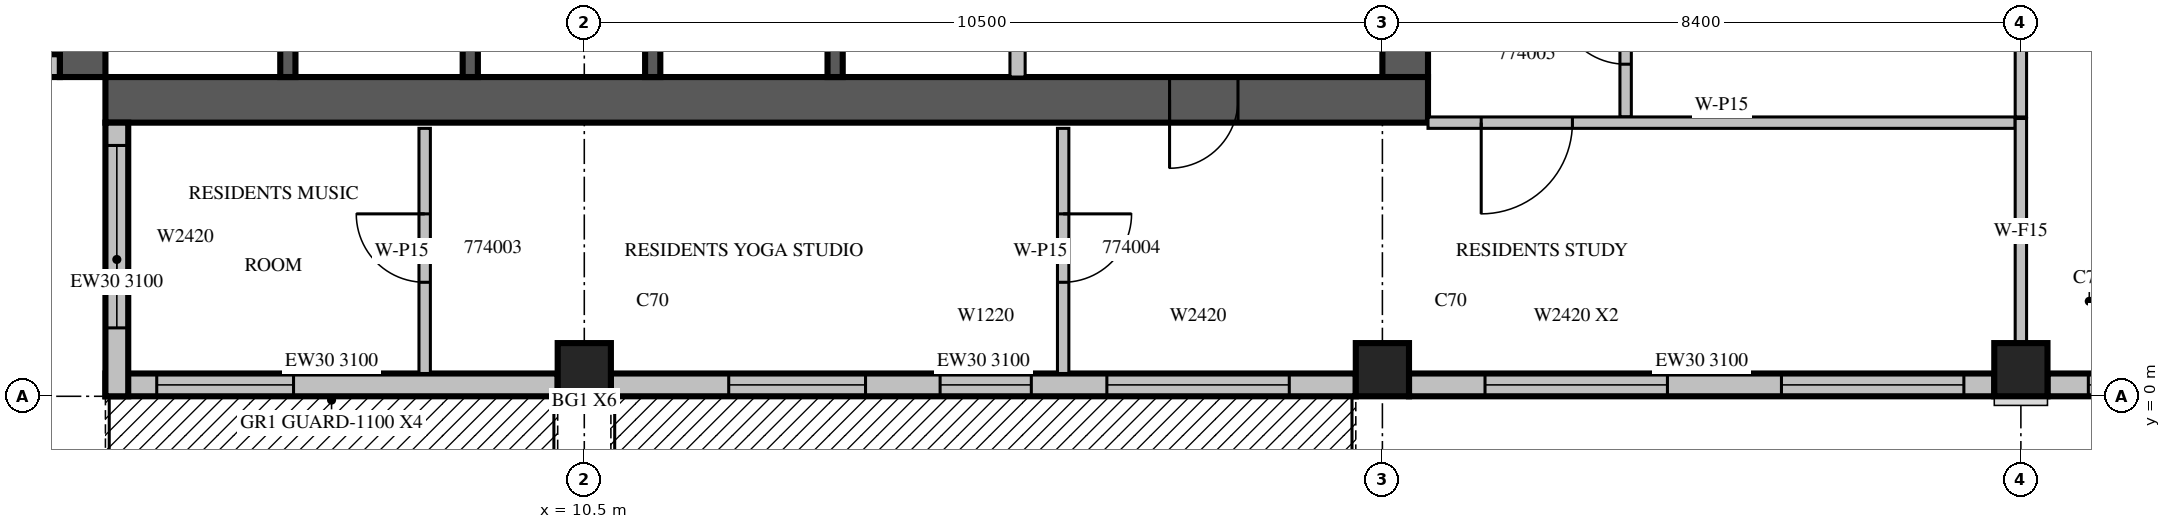
"""IFC4 building model, lengths in metres.
Left out: names, types, materials, properties, quantities, classifications, styles, units other than length and angle.
Written with IfcOpenShell. Run it as: python <this file> out.ifc"""

import sys

from ifc_helpers import new_model, si_unit, direction, frame, frame_2d, origin, origin_2d, place, context, subcontext, project, spatial, rectangle, extrude, source, transform, mapped, element, fill, save


model = new_model("IFC4")
c1 = context("Model", 3, precision=1e-05, world=origin(), true_north=direction((0.0, 1.0)))
c2 = subcontext(c1, "Body", "Model", "MODEL_VIEW")
j1 = project(units=[si_unit("LENGTHUNIT", "METRE"), si_unit("PLANEANGLEUNIT", "RADIAN")], contexts=[c1])
p1 = place(None, origin())
s1 = spatial("IfcSite", under=j1, at=p1, CompositionType="ELEMENT")
p2 = place(p1, origin())
s2 = spatial("IfcBuilding", under=s1, at=p2, CompositionType="ELEMENT")
p3 = place(p2, frame((0.0, 0.0, 319.5)))
s3 = spatial("IfcBuildingStorey", under=s2, at=p3, CompositionType="ELEMENT", Elevation=319.5)
m1 = source(origin(), c2, "Body", "SweptSolid", [
    extrude(rectangle(XDim=0.7, YDim=0.7, at=origin_2d()), origin(), (0.0, 0.0, 1.0), 3.5),
])
for number, where, z_axis, x_axis in (
    (1, (10.5, 0.35, 0.0), (0.0, 0.0, 1.0), (1.0, 0.0, 0.0)),
    (2, (21.0, 0.35, 0.0), (0.0, 0.0, 1.0), (1.0, 0.0, 0.0)),
    (3, (29.4, 0.35, 0.0), (0.0, 0.0, 1.0), (1.0, 0.0, 0.0)),
):
    element("IfcColumn", number, at=place(p3, frame(where, z_axis=z_axis, x_axis=x_axis)), inside=s3, PredefinedType="COLUMN", context=c2, shape_type="MappedRepresentation", body=[
        mapped(m1, transform((0.0, 0.0, 0.0), scale=1.0)),
    ])
m2 = source(origin(), c2, "Body", "SweptSolid", [
    extrude(rectangle(XDim=17.4, YDim=0.6, at=frame_2d((8.7, 0.0))), origin(), (0.0, 0.0, 1.0), 3.5),
])
p4 = place(p3, frame((3.9, 4.2, 0.0), z_axis=(0.0, 0.0, 1.0), x_axis=(0.0, 1.0, 0.0)))
e4 = element("IfcWall", 4, at=p4, inside=s3, PredefinedType="SHEAR", context=c2, shape_type="MappedRepresentation", body=[
    mapped(m2, transform((0.0, 0.0, 0.0), scale=1.0)),
])
m3 = source(origin(), c2, "Body", "SweptSolid", [
    extrude(rectangle(XDim=2.2, YDim=2.1, at=frame_2d((1.1, 1.05))), frame((0.0, 0.31, 0.0), z_axis=(0.0, -1.0, 0.0), x_axis=(1.0, 0.0, 0.0)), (0.0, 0.0, 1.0), 0.62),
])
p5 = place(p4, frame((4.2, 0.0, 0.0)))
e5 = element("IfcOpeningElement", 5, at=p5, cuts=e4, PredefinedType="OPENING", context=c2, shape_type="MappedRepresentation", body=[
    mapped(m3, transform((0.0, 0.0, 0.0), scale=1.0)),
])
m4 = source(origin(), c2, "Body", "SweptSolid", [
    extrude(rectangle(XDim=6.3, YDim=0.6, at=frame_2d((3.15, 0.0))), origin(), (0.0, 0.0, 1.0), 3.5),
])
p6 = place(p3, frame((21.3, 4.2, 0.0), z_axis=(0.0, 0.0, 1.0), x_axis=(0.0, 1.0, 0.0)))
e6 = element("IfcWall", 6, at=p6, inside=s3, PredefinedType="SHEAR", context=c2, shape_type="MappedRepresentation", body=[
    mapped(m4, transform((0.0, 0.0, 0.0), scale=1.0)),
])
p7 = place(p6, frame((4.0, 0.0, 0.0)))
e7 = element("IfcOpeningElement", 7, at=p7, cuts=e6, PredefinedType="OPENING", context=c2, shape_type="MappedRepresentation", body=[
    mapped(m3, transform((0.0, 0.0, 0.0), scale=1.0)),
])
p8 = place(p3, frame((4.2, 3.9, 0.0), z_axis=(0.0, 0.0, 1.0), x_axis=(1.0, 0.0, 0.0)))
e8 = element("IfcWall", 8, at=p8, inside=s3, PredefinedType="SHEAR", context=c2, shape_type="MappedRepresentation", body=[
    mapped(m2, transform((0.0, 0.0, 0.0), scale=1.0)),
])
m5 = source(origin(), c2, "Body", "SweptSolid", [
    extrude(rectangle(XDim=0.9, YDim=2.1, at=frame_2d((0.45, 1.05))), frame((0.0, 0.31, 0.0), z_axis=(0.0, -1.0, 0.0), x_axis=(1.0, 0.0, 0.0)), (0.0, 0.0, 1.0), 0.62),
])
p9 = place(p8, frame((14.0, 0.0, 0.0)))
e9 = element("IfcOpeningElement", 9, at=p9, cuts=e8, PredefinedType="OPENING", context=c2, shape_type="MappedRepresentation", body=[
    mapped(m5, transform((0.0, 0.0, 0.0), scale=1.0)),
])
m6 = source(origin(), c2, "Body", "SweptSolid", [
    extrude(rectangle(XDim=5.95, YDim=0.3, at=frame_2d((2.975, 0.0))), origin(), (0.0, 0.0, 1.0), 3.1),
])
p10 = place(p3, frame((4.2, 0.15, 0.0), z_axis=(0.0, 0.0, 1.0), x_axis=(1.0, 0.0, 0.0)))
e10 = element("IfcWall", 10, at=p10, inside=s3, PredefinedType="STANDARD", context=c2, shape_type="MappedRepresentation", body=[
    mapped(m6, transform((0.0, 0.0, 0.0), scale=1.0)),
])
m7 = source(origin(), c2, "Body", "SweptSolid", [
    extrude(rectangle(XDim=1.8, YDim=2.4, at=frame_2d((0.9, 1.2))), frame((0.0, 0.16, 0.0), z_axis=(0.0, -1.0, 0.0), x_axis=(1.0, 0.0, 0.0)), (0.0, 0.0, 1.0), 0.32),
])
p11 = place(p10, frame((0.675, 0.0, 0.0)))
e11 = element("IfcOpeningElement", 11, at=p11, cuts=e10, PredefinedType="OPENING", context=c2, shape_type="MappedRepresentation", body=[
    mapped(m7, transform((0.0, 0.0, 0.0), scale=1.0)),
])
m8 = source(origin(), c2, "Body", "SweptSolid", [
    extrude(rectangle(XDim=9.8, YDim=0.3, at=frame_2d((4.9, 0.0))), origin(), (0.0, 0.0, 1.0), 3.1),
])
p12 = place(p3, frame((10.85, 0.15, 0.0), z_axis=(0.0, 0.0, 1.0), x_axis=(1.0, 0.0, 0.0)))
e12 = element("IfcWall", 12, at=p12, inside=s3, PredefinedType="STANDARD", context=c2, shape_type="MappedRepresentation", body=[
    mapped(m8, transform((0.0, 0.0, 0.0), scale=1.0)),
])
p13 = place(p12, frame((1.55, 0.0, 0.0)))
e13 = element("IfcOpeningElement", 13, at=p13, cuts=e12, PredefinedType="OPENING", context=c2, shape_type="MappedRepresentation", body=[
    mapped(m7, transform((0.0, 0.0, 0.0), scale=1.0)),
])
m9 = source(origin(), c2, "Body", "SweptSolid", [
    extrude(rectangle(XDim=2.4, YDim=2.0, at=frame_2d((1.2, 1.0))), frame((0.0, 0.16, 0.0), z_axis=(0.0, -1.0, 0.0), x_axis=(1.0, 0.0, 0.0)), (0.0, 0.0, 1.0), 0.32),
])
p14 = place(p12, frame((6.525, 0.0, 0.6)))
e14 = element("IfcOpeningElement", 14, at=p14, cuts=e12, PredefinedType="OPENING", context=c2, shape_type="MappedRepresentation", body=[
    mapped(m9, transform((0.0, 0.0, 0.0), scale=1.0)),
])
m10 = source(origin(), c2, "Body", "SweptSolid", [
    extrude(rectangle(XDim=1.2, YDim=2.0, at=frame_2d((0.6, 1.0))), frame((0.0, 0.16, 0.0), z_axis=(0.0, -1.0, 0.0), x_axis=(1.0, 0.0, 0.0)), (0.0, 0.0, 1.0), 0.32),
])
p15 = place(p12, frame((4.331, 0.0, 0.6)))
e15 = element("IfcOpeningElement", 15, at=p15, cuts=e12, PredefinedType="OPENING", context=c2, shape_type="MappedRepresentation", body=[
    mapped(m10, transform((0.0, 0.0, 0.0), scale=1.0)),
])
m11 = source(origin(), c2, "Body", "SweptSolid", [
    extrude(rectangle(XDim=7.7, YDim=0.3, at=frame_2d((3.85, 0.0))), origin(), (0.0, 0.0, 1.0), 3.1),
])
p16 = place(p3, frame((21.35, 0.15, 0.0), z_axis=(0.0, 0.0, 1.0), x_axis=(1.0, 0.0, 0.0)))
e16 = element("IfcWall", 16, at=p16, inside=s3, PredefinedType="STANDARD", context=c2, shape_type="MappedRepresentation", body=[
    mapped(m11, transform((0.0, 0.0, 0.0), scale=1.0)),
])
p17 = place(p16, frame((1.0, 0.0, 0.6)))
e17 = element("IfcOpeningElement", 17, at=p17, cuts=e16, PredefinedType="OPENING", context=c2, shape_type="MappedRepresentation", body=[
    mapped(m9, transform((0.0, 0.0, 0.0), scale=1.0)),
])
p18 = place(p16, frame((4.9, 0.0, 0.6)))
e18 = element("IfcOpeningElement", 18, at=p18, cuts=e16, PredefinedType="OPENING", context=c2, shape_type="MappedRepresentation", body=[
    mapped(m9, transform((0.0, 0.0, 0.0), scale=1.0)),
])
p19 = place(p3, frame((29.75, 0.15, 0.0), z_axis=(0.0, 0.0, 1.0), x_axis=(1.0, 0.0, 0.0)))
e19 = element("IfcWall", 19, at=p19, inside=s3, PredefinedType="STANDARD", context=c2, shape_type="MappedRepresentation", body=[
    mapped(m11, transform((0.0, 0.0, 0.0), scale=1.0)),
])
p20 = place(p19, frame((0.537, 0.0, 0.6)))
e20 = element("IfcOpeningElement", 20, at=p20, cuts=e19, PredefinedType="OPENING", context=c2, shape_type="MappedRepresentation", body=[
    mapped(m10, transform((0.0, 0.0, 0.0), scale=1.0)),
])
p21 = place(p19, frame((6.062, 0.0, 0.6)))
e21 = element("IfcOpeningElement", 21, at=p21, cuts=e19, PredefinedType="OPENING", context=c2, shape_type="MappedRepresentation", body=[
    mapped(m10, transform((0.0, 0.0, 0.0), scale=1.0)),
])
p22 = place(p19, frame((2.7, 0.0, 0.6)))
e22 = element("IfcOpeningElement", 22, at=p22, cuts=e19, PredefinedType="OPENING", context=c2, shape_type="MappedRepresentation", body=[
    mapped(m9, transform((0.0, 0.0, 0.0), scale=1.0)),
])
m12 = source(origin(), c2, "Body", "SweptSolid", [
    extrude(rectangle(XDim=3.6, YDim=0.3, at=frame_2d((1.8, 0.0))), origin(), (0.0, 0.0, 1.0), 3.1),
])
p23 = place(p3, frame((0.0, 4.35, 0.0), z_axis=(0.0, 0.0, 1.0), x_axis=(1.0, 0.0, 0.0)))
e23 = element("IfcWall", 23, at=p23, inside=s3, PredefinedType="STANDARD", context=c2, shape_type="MappedRepresentation", body=[
    mapped(m12, transform((0.0, 0.0, 0.0), scale=1.0)),
])
p24 = place(p23, frame((0.9, 0.0, 0.6)))
e24 = element("IfcOpeningElement", 24, at=p24, cuts=e23, PredefinedType="OPENING", context=c2, shape_type="MappedRepresentation", body=[
    mapped(m9, transform((0.0, 0.0, 0.0), scale=1.0)),
])
p25 = place(p3, frame((4.35, 3.6, 0.0), z_axis=(0.0, 0.0, 1.0), x_axis=(0.0, -1.0, 0.0)))
e25 = element("IfcWall", 25, at=p25, inside=s3, PredefinedType="STANDARD", context=c2, shape_type="MappedRepresentation", body=[
    mapped(m12, transform((0.0, 0.0, 0.0), scale=1.0)),
])
p26 = place(p25, frame((0.3, 0.0, 0.6)))
e26 = element("IfcOpeningElement", 26, at=p26, cuts=e25, PredefinedType="OPENING", context=c2, shape_type="MappedRepresentation", body=[
    mapped(m9, transform((0.0, 0.0, 0.0), scale=1.0)),
])
m13 = source(origin(), c2, "Body", "SweptSolid", [
    extrude(rectangle(XDim=3.1, YDim=0.2, at=frame_2d((1.55, 0.0))), origin(), (0.0, 0.0, 1.0), 3.5),
])
for number, where, z_axis, x_axis in (
    (27, (6.6, 4.2, 0.0), (0.0, 0.0, 1.0), (0.0, 1.0, 0.0)),
    (28, (9.0, 4.2, 0.0), (0.0, 0.0, 1.0), (0.0, 1.0, 0.0)),
    (29, (11.4, 4.2, 0.0), (0.0, 0.0, 1.0), (0.0, 1.0, 0.0)),
):
    element("IfcWall", number, at=place(p3, frame(where, z_axis=z_axis, x_axis=x_axis)), inside=s3, PredefinedType="SOLIDWALL", context=c2, shape_type="MappedRepresentation", body=[
        mapped(m13, transform((0.0, 0.0, 0.0), scale=1.0)),
    ])
m14 = source(origin(), c2, "Body", "SweptSolid", [
    extrude(rectangle(XDim=3.1, YDim=0.2, at=frame_2d((1.55, 0.0))), origin(), (0.0, 0.0, 1.0), 3.1),
])
p27 = place(p3, frame((13.8, 4.2, 0.0), z_axis=(0.0, 0.0, 1.0), x_axis=(0.0, 1.0, 0.0)))
e30 = element("IfcWall", 30, at=p27, inside=s3, PredefinedType="SOLIDWALL", context=c2, shape_type="MappedRepresentation", body=[
    mapped(m14, transform((0.0, 0.0, 0.0), scale=1.0)),
])
m15 = source(origin(), c2, "Body", "SweptSolid", [
    extrude(rectangle(XDim=3.1, YDim=0.2, at=frame_2d((1.55, 0.0))), origin(), (0.0, 0.0, 1.0), 3.1),
])
p28 = place(p3, frame((16.2, 4.2, 0.0), z_axis=(0.0, 0.0, 1.0), x_axis=(0.0, 1.0, 0.0)))
e31 = element("IfcWall", 31, at=p28, inside=s3, PredefinedType="PARTITIONING", context=c2, shape_type="MappedRepresentation", body=[
    mapped(m15, transform((0.0, 0.0, 0.0), scale=1.0)),
])
m16 = source(origin(), c2, "Body", "SweptSolid", [
    extrude(rectangle(XDim=4.575, YDim=0.15, at=frame_2d((2.288, 0.0))), origin(), (0.0, 0.0, 1.0), 3.1),
])
p29 = place(p3, frame((24.2, 8.25, 0.0), z_axis=(0.0, 0.0, 1.0), x_axis=(0.0, -1.0, 0.0)))
e32 = element("IfcWall", 32, at=p29, inside=s3, PredefinedType="PARTITIONING", context=c2, shape_type="MappedRepresentation", body=[
    mapped(m16, transform((0.0, 0.0, 0.0), scale=1.0)),
])
m17 = source(origin(), c2, "Body", "SweptSolid", [
    extrude(rectangle(XDim=0.9, YDim=2.1, at=frame_2d((0.45, 1.05))), frame((0.0, 0.085, 0.0), z_axis=(0.0, -1.0, 0.0), x_axis=(1.0, 0.0, 0.0)), (0.0, 0.0, 1.0), 0.17),
])
p30 = place(p29, frame((2.981, 0.0, 0.0)))
e33 = element("IfcOpeningElement", 33, at=p30, cuts=e32, PredefinedType="OPENING", context=c2, shape_type="MappedRepresentation", body=[
    mapped(m17, transform((0.0, 0.0, 0.0), scale=1.0)),
])
p31 = place(p3, frame((29.4, 3.675, 0.0), z_axis=(0.0, 0.0, 1.0), x_axis=(0.0, 1.0, 0.0)))
e34 = element("IfcWall", 34, at=p31, inside=s3, PredefinedType="PARTITIONING", context=c2, shape_type="MappedRepresentation", body=[
    mapped(m16, transform((0.0, 0.0, 0.0), scale=1.0)),
])
m18 = source(origin(), c2, "Body", "SweptSolid", [
    extrude(rectangle(XDim=3.225, YDim=0.15, at=frame_2d((1.613, 0.0))), origin(), (0.0, 0.0, 1.0), 3.1),
])
p32 = place(p3, frame((8.4, 3.525, 0.0), z_axis=(0.0, 0.0, 1.0), x_axis=(0.0, -1.0, 0.0)))
e35 = element("IfcWall", 35, at=p32, inside=s3, PredefinedType="PARTITIONING", context=c2, shape_type="MappedRepresentation", body=[
    mapped(m18, transform((0.0, 0.0, 0.0), scale=1.0)),
])
p33 = place(p32, frame((1.125, 0.0, 0.0)))
e36 = element("IfcOpeningElement", 36, at=p33, cuts=e35, PredefinedType="OPENING", context=c2, shape_type="MappedRepresentation", body=[
    mapped(m17, transform((0.0, 0.0, 0.0), scale=1.0)),
])
p34 = place(p3, frame((16.8, 3.525, 0.0), z_axis=(0.0, 0.0, 1.0), x_axis=(0.0, -1.0, 0.0)))
e37 = element("IfcWall", 37, at=p34, inside=s3, PredefinedType="PARTITIONING", context=c2, shape_type="MappedRepresentation", body=[
    mapped(m18, transform((0.0, 0.0, 0.0), scale=1.0)),
])
p35 = place(p34, frame((1.125, 0.0, 0.0)))
e38 = element("IfcOpeningElement", 38, at=p35, cuts=e37, PredefinedType="OPENING", context=c2, shape_type="MappedRepresentation", body=[
    mapped(m17, transform((0.0, 0.0, 0.0), scale=1.0)),
])
m19 = source(origin(), c2, "Body", "SweptSolid", [
    extrude(rectangle(XDim=7.725, YDim=0.15, at=frame_2d((3.862, 0.0))), origin(), (0.0, 0.0, 1.0), 3.1),
])
p36 = place(p3, frame((21.6, 3.6, 0.0), z_axis=(0.0, 0.0, 1.0), x_axis=(1.0, 0.0, 0.0)))
e39 = element("IfcWall", 39, at=p36, inside=s3, PredefinedType="PARTITIONING", context=c2, shape_type="MappedRepresentation", body=[
    mapped(m19, transform((0.0, 0.0, 0.0), scale=1.0)),
])
m20 = source(origin(), c2, "Body", "SweptSolid", [
    extrude(rectangle(XDim=1.2, YDim=2.1, at=frame_2d((0.6, 1.05))), frame((0.0, 0.085, 0.0), z_axis=(0.0, -1.0, 0.0), x_axis=(1.0, 0.0, 0.0)), (0.0, 0.0, 1.0), 0.17),
])
p37 = place(p36, frame((0.7, 0.0, 0.0)))
e40 = element("IfcOpeningElement", 40, at=p37, cuts=e39, PredefinedType="OPENING", context=c2, shape_type="MappedRepresentation", body=[
    mapped(m20, transform((0.0, 0.0, 0.0), scale=1.0)),
])
m21 = source(origin(), c2, "Body", "SweptSolid", [
    extrude(rectangle(XDim=2.956, YDim=0.15, at=frame_2d((1.478, 0.0))), origin(), (0.0, 0.0, 1.0), 3.1),
])
p38 = place(p3, frame((29.4, 0.699, 0.0), z_axis=(0.0, 0.0, 1.0), x_axis=(0.0, 1.0, 0.0)))
e41 = element("IfcWall", 41, at=p38, inside=s3, PredefinedType="PARTITIONING", context=c2, shape_type="MappedRepresentation", body=[
    mapped(m21, transform((0.0, 0.0, 0.0), scale=1.0)),
])
m22 = source(origin(), c2, "Body", "SweptSolid", [
    extrude(rectangle(XDim=1.8, YDim=2.4, at=frame_2d((0.9, 1.2))), frame((0.0, 0.025, 0.0), z_axis=(0.0, -1.0, 0.0), x_axis=(1.0, 0.0, 0.0)), (0.0, 0.0, 1.0), 0.05),
])
p39 = place(p11, origin())
e42 = element("IfcDoor", 42, at=p39, inside=s3, OperationType="SLIDING_TO_LEFT", PredefinedType="DOOR", context=c2, shape_type="MappedRepresentation", body=[
    mapped(m22, transform((0.0, 0.0, 0.0), scale=1.0)),
])
fill(e11, e42)
p40 = place(p13, origin())
e43 = element("IfcDoor", 43, at=p40, inside=s3, OperationType="SLIDING_TO_LEFT", PredefinedType="DOOR", context=c2, shape_type="MappedRepresentation", body=[
    mapped(m22, transform((0.0, 0.0, 0.0), scale=1.0)),
])
fill(e13, e43)
m23 = source(origin(), c2, "Body", "SweptSolid", [
    extrude(rectangle(XDim=2.4, YDim=2.0, at=frame_2d((1.2, 1.0))), frame((0.0, 0.03, 0.0), z_axis=(0.0, -1.0, 0.0), x_axis=(1.0, 0.0, 0.0)), (0.0, 0.0, 1.0), 0.06),
])
p41 = place(p14, origin())
e44 = element("IfcWindow", 44, at=p41, inside=s3, PartitioningType="SINGLE_PANEL", PredefinedType="WINDOW", context=c2, shape_type="MappedRepresentation", body=[
    mapped(m23, transform((0.0, 0.0, 0.0), scale=1.0)),
])
fill(e14, e44)
m24 = source(origin(), c2, "Body", "SweptSolid", [
    extrude(rectangle(XDim=1.2, YDim=2.0, at=frame_2d((0.6, 1.0))), frame((0.0, 0.03, 0.0), z_axis=(0.0, -1.0, 0.0), x_axis=(1.0, 0.0, 0.0)), (0.0, 0.0, 1.0), 0.06),
])
p42 = place(p15, origin())
e45 = element("IfcWindow", 45, at=p42, inside=s3, PartitioningType="SINGLE_PANEL", PredefinedType="WINDOW", context=c2, shape_type="MappedRepresentation", body=[
    mapped(m24, transform((0.0, 0.0, 0.0), scale=1.0)),
])
fill(e15, e45)
p43 = place(p17, origin())
e46 = element("IfcWindow", 46, at=p43, inside=s3, PartitioningType="SINGLE_PANEL", PredefinedType="WINDOW", context=c2, shape_type="MappedRepresentation", body=[
    mapped(m23, transform((0.0, 0.0, 0.0), scale=1.0)),
])
fill(e17, e46)
p44 = place(p18, origin())
e47 = element("IfcWindow", 47, at=p44, inside=s3, PartitioningType="SINGLE_PANEL", PredefinedType="WINDOW", context=c2, shape_type="MappedRepresentation", body=[
    mapped(m23, transform((0.0, 0.0, 0.0), scale=1.0)),
])
fill(e18, e47)
p45 = place(p20, origin())
e48 = element("IfcWindow", 48, at=p45, inside=s3, PartitioningType="SINGLE_PANEL", PredefinedType="WINDOW", context=c2, shape_type="MappedRepresentation", body=[
    mapped(m24, transform((0.0, 0.0, 0.0), scale=1.0)),
])
fill(e20, e48)
p46 = place(p26, origin())
e49 = element("IfcWindow", 49, at=p46, inside=s3, PartitioningType="SINGLE_PANEL", PredefinedType="WINDOW", context=c2, shape_type="MappedRepresentation", body=[
    mapped(m23, transform((0.0, 0.0, 0.0), scale=1.0)),
])
fill(e26, e49)
m25 = source(origin(), c2, "Body", "SweptSolid", [
    extrude(rectangle(XDim=0.9, YDim=2.1, at=frame_2d((0.45, 1.05))), frame((0.0, 0.025, 0.0), z_axis=(0.0, -1.0, 0.0), x_axis=(1.0, 0.0, 0.0)), (0.0, 0.0, 1.0), 0.05),
])
p47 = place(p9, origin())
e50 = element("IfcDoor", 50, at=p47, inside=s3, OperationType="SINGLE_SWING_RIGHT", PredefinedType="DOOR", context=c2, shape_type="MappedRepresentation", body=[
    mapped(m25, transform((0.0, 0.0, 0.0), scale=1.0)),
])
fill(e9, e50)
p48 = place(p30, origin())
e51 = element("IfcDoor", 51, at=p48, inside=s3, OperationType="SINGLE_SWING_RIGHT", PredefinedType="DOOR", context=c2, shape_type="MappedRepresentation", body=[
    mapped(m25, transform((0.0, 0.0, 0.0), scale=1.0)),
])
fill(e33, e51)
p49 = place(p33, origin())
e52 = element("IfcDoor", 52, at=p49, inside=s3, OperationType="SINGLE_SWING_RIGHT", PredefinedType="DOOR", context=c2, shape_type="MappedRepresentation", body=[
    mapped(m25, transform((0.0, 0.0, 0.0), scale=1.0)),
])
fill(e36, e52)
p50 = place(p35, origin())
e53 = element("IfcDoor", 53, at=p50, inside=s3, OperationType="SINGLE_SWING_LEFT", PredefinedType="DOOR", context=c2, shape_type="MappedRepresentation", body=[
    mapped(m25, transform((0.0, 0.0, 0.0), scale=1.0)),
])
fill(e38, e53)
m26 = source(origin(), c2, "Body", "SweptSolid", [
    extrude(rectangle(XDim=1.2, YDim=2.1, at=frame_2d((0.6, 1.05))), frame((0.0, 0.025, 0.0), z_axis=(0.0, -1.0, 0.0), x_axis=(1.0, 0.0, 0.0)), (0.0, 0.0, 1.0), 0.05),
])
p51 = place(p37, origin())
e54 = element("IfcDoor", 54, at=p51, inside=s3, OperationType="SINGLE_SWING_RIGHT", PredefinedType="DOOR", context=c2, shape_type="MappedRepresentation", body=[
    mapped(m26, transform((0.0, 0.0, 0.0), scale=1.0)),
])
fill(e40, e54)
save(model, sys.argv[1])
